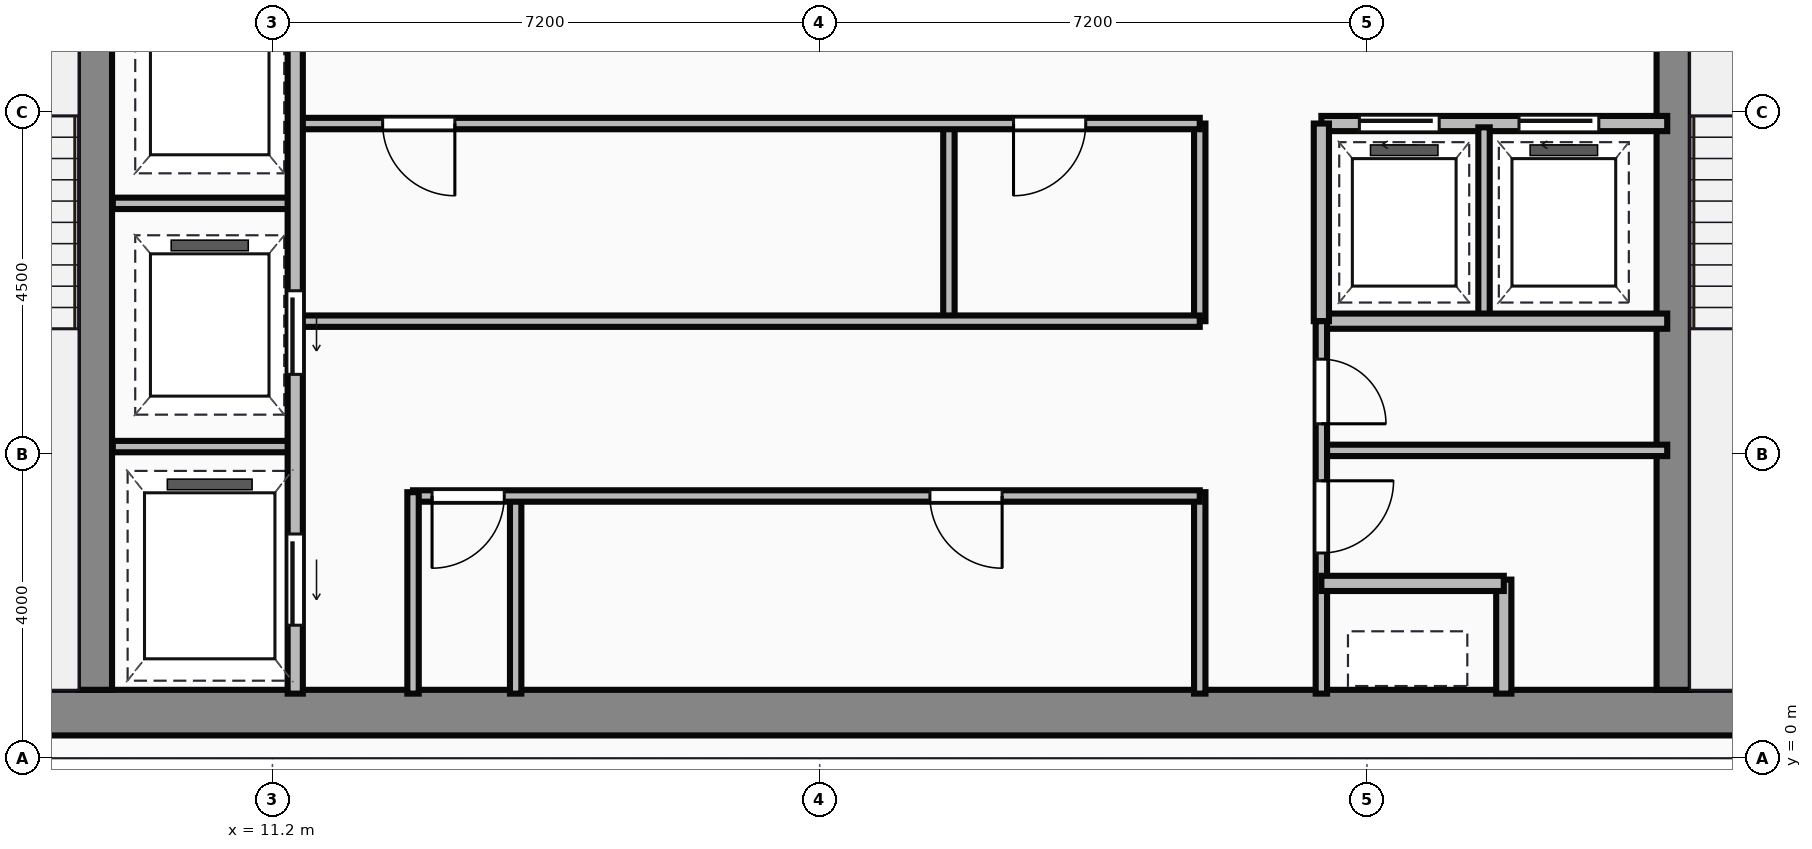
"""IFC4 building model, lengths in metres.
Left out: names, types, materials, properties, quantities, classifications, styles, units other than length and angle.
Written with IfcOpenShell. Run it as: python <this file> out.ifc"""

import sys

from ifc_helpers import new_model, si_unit, direction, frame, frame_2d, origin, place, context, subcontext, project, spatial, rectangle, extrude, source, transform, mapped, element, fill, save


model = new_model("IFC4")
c1 = context("Model", 3, precision=1e-05, world=origin(), true_north=direction((0.0, 1.0)))
c2 = subcontext(c1, "Body", "Model", "MODEL_VIEW")
j1 = project(units=[si_unit("LENGTHUNIT", "METRE"), si_unit("PLANEANGLEUNIT", "RADIAN")], contexts=[c1])
p1 = place(None, origin())
s1 = spatial("IfcSite", under=j1, at=p1, CompositionType="ELEMENT")
p2 = place(p1, origin())
s2 = spatial("IfcBuilding", under=s1, at=p2, CompositionType="ELEMENT")
p3 = place(p2, frame((0.0, 0.0, 210.5)))
s3 = spatial("IfcBuildingStorey", under=s2, at=p3, CompositionType="ELEMENT", Elevation=210.5)
m1 = source(origin(), c2, "Body", "SweptSolid", [
    extrude(rectangle(XDim=29.5, YDim=0.6, at=frame_2d((14.75, 0.0))), origin(), (0.0, 0.0, 1.0), 3.65),
])
p4 = place(p3, frame((4.5, 0.6, 0.0), z_axis=(0.0, 0.0, 1.0), x_axis=(1.0, 0.0, 0.0)))
e1 = element("IfcWall", 1, at=p4, inside=s3, PredefinedType="SHEAR", context=c2, shape_type="MappedRepresentation", body=[
    mapped(m1, transform((0.0, 0.0, 0.0))),
])
m2 = source(origin(), c2, "Body", "SweptSolid", [
    extrude(rectangle(XDim=12.5, YDim=0.45, at=frame_2d((6.25, 0.0))), origin(), (0.0, 0.0, 1.0), 3.65),
])
for number, where, z_axis, x_axis in (
    (2, (8.865, 0.9, 0.0), (0.0, 0.0, 1.0), (0.0, 1.0, 0.0)),
    (3, (29.635, 0.9, 0.0), (0.0, 0.0, 1.0), (0.0, 1.0, 0.0)),
):
    element("IfcWall", number, at=place(p3, frame(where, z_axis=z_axis, x_axis=x_axis)), inside=s3, PredefinedType="SHEAR", context=c2, shape_type="MappedRepresentation", body=[
        mapped(m2, transform((0.0, 0.0, 0.0))),
    ])
m3 = source(origin(), c2, "Body", "SweptSolid", [
    extrude(rectangle(XDim=9.6, YDim=0.2, at=frame_2d((4.8, 0.0))), origin(), (0.0, 0.0, 1.0), 3.4),
])
p5 = place(p3, frame((11.5, 0.85, 0.0), z_axis=(0.0, 0.0, 1.0), x_axis=(0.0, 1.0, 0.0)))
e4 = element("IfcWall", 4, at=p5, inside=s3, PredefinedType="PARTITIONING", context=c2, shape_type="MappedRepresentation", body=[
    mapped(m3, transform((0.0, 0.0, 0.0))),
])
p6 = place(p5, frame((4.2, 0.0, 0.0)))
e5 = element("IfcOpeningElement", 5, at=p6, cuts=e4, PredefinedType="OPENING", context=c2, shape_type="SweptSolid", body=[
    extrude(rectangle(XDim=1.1, YDim=2.15, at=frame_2d((0.55, 1.075))), frame((0.0, 0.11, 0.0), z_axis=(0.0, -1.0, 0.0), x_axis=(1.0, 0.0, 0.0)), (0.0, 0.0, 1.0), 0.22),
])
p7 = place(p5, frame((0.9, 0.0, 0.0)))
e6 = element("IfcOpeningElement", 6, at=p7, cuts=e4, PredefinedType="OPENING", context=c2, shape_type="SweptSolid", body=[
    extrude(rectangle(XDim=1.2, YDim=2.15, at=frame_2d((0.6, 1.075))), frame((0.0, 0.11, 0.0), z_axis=(0.0, -1.0, 0.0), x_axis=(1.0, 0.0, 0.0)), (0.0, 0.0, 1.0), 0.22),
])
m4 = source(origin(), c2, "Body", "SweptSolid", [
    extrude(rectangle(XDim=2.4, YDim=0.15, at=frame_2d((1.2, 0.0))), origin(), (0.0, 0.0, 1.0), 3.4),
])
for number, where, z_axis, x_axis in (
    (7, (9.1, 4.1, 0.0), (0.0, 0.0, 1.0), (1.0, 0.0, 0.0)),
    (8, (9.1, 7.3, 0.0), (0.0, 0.0, 1.0), (1.0, 0.0, 0.0)),
):
    element("IfcWall", number, at=place(p3, frame(where, z_axis=z_axis, x_axis=x_axis)), inside=s3, PredefinedType="PARTITIONING", context=c2, shape_type="MappedRepresentation", body=[
        mapped(m4, transform((0.0, 0.0, 0.0))),
    ])
m5 = source(origin(), c2, "Body", "SweptSolid", [
    extrude(rectangle(XDim=2.65, YDim=0.15, at=frame_2d((1.325, 0.0))), origin(), (0.0, 0.0, 1.0), 3.4),
])
p8 = place(p3, frame((13.05, 0.85, 0.0), z_axis=(0.0, 0.0, 1.0), x_axis=(0.0, 1.0, 0.0)))
e9 = element("IfcWall", 9, at=p8, inside=s3, PredefinedType="PARTITIONING", context=c2, shape_type="MappedRepresentation", body=[
    mapped(m5, transform((0.0, 0.0, 0.0))),
])
m6 = source(origin(), c2, "Body", "SweptSolid", [
    extrude(rectangle(XDim=10.35, YDim=0.15, at=frame_2d((5.175, 0.0))), origin(), (0.0, 0.0, 1.0), 3.4),
])
p9 = place(p3, frame((13.05, 3.45, 0.0), z_axis=(0.0, 0.0, 1.0), x_axis=(1.0, 0.0, 0.0)))
e10 = element("IfcWall", 10, at=p9, inside=s3, PredefinedType="PARTITIONING", context=c2, shape_type="MappedRepresentation", body=[
    mapped(m6, transform((0.0, 0.0, 0.0))),
])
p10 = place(p9, frame((0.25, 0.0, 0.0)))
e11 = element("IfcOpeningElement", 11, at=p10, cuts=e10, PredefinedType="OPENING", context=c2, shape_type="SweptSolid", body=[
    extrude(rectangle(XDim=0.95, YDim=2.15, at=frame_2d((0.475, 1.075))), frame((0.0, 0.085, 0.0), z_axis=(0.0, -1.0, 0.0), x_axis=(1.0, 0.0, 0.0)), (0.0, 0.0, 1.0), 0.17),
])
p11 = place(p9, frame((6.8, 0.0, 0.0)))
e12 = element("IfcOpeningElement", 12, at=p11, cuts=e10, PredefinedType="OPENING", context=c2, shape_type="SweptSolid", body=[
    extrude(rectangle(XDim=0.95, YDim=2.15, at=frame_2d((0.475, 1.075))), frame((0.0, 0.085, 0.0), z_axis=(0.0, -1.0, 0.0), x_axis=(1.0, 0.0, 0.0)), (0.0, 0.0, 1.0), 0.17),
])
p12 = place(p3, frame((23.4, 0.85, 0.0), z_axis=(0.0, 0.0, 1.0), x_axis=(0.0, 1.0, 0.0)))
e13 = element("IfcWall", 13, at=p12, inside=s3, PredefinedType="PARTITIONING", context=c2, shape_type="MappedRepresentation", body=[
    mapped(m5, transform((0.0, 0.0, 0.0))),
])
m7 = source(origin(), c2, "Body", "SweptSolid", [
    extrude(rectangle(XDim=2.6, YDim=0.15, at=frame_2d((1.3, 0.0))), origin(), (0.0, 0.0, 1.0), 3.4),
])
p13 = place(p3, frame((14.4, 0.85, 0.0), z_axis=(0.0, 0.0, 1.0), x_axis=(0.0, 1.0, 0.0)))
e14 = element("IfcWall", 14, at=p13, inside=s3, PredefinedType="PARTITIONING", context=c2, shape_type="MappedRepresentation", body=[
    mapped(m7, transform((0.0, 0.0, 0.0))),
])
m8 = source(origin(), c2, "Body", "SweptSolid", [
    extrude(rectangle(XDim=11.85, YDim=0.15, at=frame_2d((5.925, 0.0))), origin(), (0.0, 0.0, 1.0), 3.4),
])
p14 = place(p3, frame((11.55, 5.75, 0.0), z_axis=(0.0, 0.0, 1.0), x_axis=(1.0, 0.0, 0.0)))
e15 = element("IfcWall", 15, at=p14, inside=s3, PredefinedType="PARTITIONING", context=c2, shape_type="MappedRepresentation", body=[
    mapped(m8, transform((0.0, 0.0, 0.0))),
])
p15 = place(p3, frame((11.55, 8.35, 0.0), z_axis=(0.0, 0.0, 1.0), x_axis=(1.0, 0.0, 0.0)))
e16 = element("IfcWall", 16, at=p15, inside=s3, PredefinedType="PARTITIONING", context=c2, shape_type="MappedRepresentation", body=[
    mapped(m8, transform((0.0, 0.0, 0.0))),
])
p16 = place(p15, frame((1.1, 0.0, 0.0)))
e17 = element("IfcOpeningElement", 17, at=p16, cuts=e16, PredefinedType="OPENING", context=c2, shape_type="SweptSolid", body=[
    extrude(rectangle(XDim=0.95, YDim=2.15, at=frame_2d((0.475, 1.075))), frame((0.0, 0.085, 0.0), z_axis=(0.0, -1.0, 0.0), x_axis=(1.0, 0.0, 0.0)), (0.0, 0.0, 1.0), 0.17),
])
p17 = place(p15, frame((9.4, 0.0, 0.0)))
e18 = element("IfcOpeningElement", 18, at=p17, cuts=e16, PredefinedType="OPENING", context=c2, shape_type="SweptSolid", body=[
    extrude(rectangle(XDim=0.95, YDim=2.15, at=frame_2d((0.475, 1.075))), frame((0.0, 0.085, 0.0), z_axis=(0.0, -1.0, 0.0), x_axis=(1.0, 0.0, 0.0)), (0.0, 0.0, 1.0), 0.17),
])
m9 = source(origin(), c2, "Body", "SweptSolid", [
    extrude(rectangle(XDim=2.6, YDim=0.15, at=frame_2d((1.3, 0.0))), origin(), (0.0, 0.0, 1.0), 3.4),
])
p18 = place(p3, frame((23.4, 5.75, 0.0), z_axis=(0.0, 0.0, 1.0), x_axis=(0.0, 1.0, 0.0)))
e19 = element("IfcWall", 19, at=p18, inside=s3, PredefinedType="PARTITIONING", context=c2, shape_type="MappedRepresentation", body=[
    mapped(m9, transform((0.0, 0.0, 0.0))),
])
m10 = source(origin(), c2, "Body", "SweptSolid", [
    extrude(rectangle(XDim=2.5, YDim=0.15, at=frame_2d((1.25, 0.0))), origin(), (0.0, 0.0, 1.0), 3.4),
])
p19 = place(p3, frame((20.1, 5.8, 0.0), z_axis=(0.0, 0.0, 1.0), x_axis=(0.0, 1.0, 0.0)))
e20 = element("IfcWall", 20, at=p19, inside=s3, PredefinedType="PARTITIONING", context=c2, shape_type="MappedRepresentation", body=[
    mapped(m10, transform((0.0, 0.0, 0.0))),
])
m11 = source(origin(), c2, "Body", "SweptSolid", [
    extrude(rectangle(XDim=4.55, YDim=0.2, at=frame_2d((2.275, 0.0))), origin(), (0.0, 0.0, 1.0), 3.4),
])
p20 = place(p3, frame((25.0, 8.35, 0.0), z_axis=(0.0, 0.0, 1.0), x_axis=(1.0, 0.0, 0.0)))
e21 = element("IfcWall", 21, at=p20, inside=s3, PredefinedType="PARTITIONING", context=c2, shape_type="MappedRepresentation", body=[
    mapped(m11, transform((0.0, 0.0, 0.0))),
])
p21 = place(p20, frame((0.5, 0.0, 0.0)))
e22 = element("IfcOpeningElement", 22, at=p21, cuts=e21, PredefinedType="OPENING", context=c2, shape_type="SweptSolid", body=[
    extrude(rectangle(XDim=1.05, YDim=2.15, at=frame_2d((0.525, 1.075))), frame((0.0, 0.11, 0.0), z_axis=(0.0, -1.0, 0.0), x_axis=(1.0, 0.0, 0.0)), (0.0, 0.0, 1.0), 0.22),
])
p22 = place(p20, frame((2.6, 0.0, 0.0)))
e23 = element("IfcOpeningElement", 23, at=p22, cuts=e21, PredefinedType="OPENING", context=c2, shape_type="SweptSolid", body=[
    extrude(rectangle(XDim=1.05, YDim=2.15, at=frame_2d((0.525, 1.075))), frame((0.0, 0.11, 0.0), z_axis=(0.0, -1.0, 0.0), x_axis=(1.0, 0.0, 0.0)), (0.0, 0.0, 1.0), 0.22),
])
p23 = place(p3, frame((25.0, 5.75, 0.0), z_axis=(0.0, 0.0, 1.0), x_axis=(1.0, 0.0, 0.0)))
e24 = element("IfcWall", 24, at=p23, inside=s3, PredefinedType="PARTITIONING", context=c2, shape_type="MappedRepresentation", body=[
    mapped(m11, transform((0.0, 0.0, 0.0))),
])
m12 = source(origin(), c2, "Body", "SweptSolid", [
    extrude(rectangle(XDim=2.6, YDim=0.2, at=frame_2d((1.3, 0.0))), origin(), (0.0, 0.0, 1.0), 3.4),
])
p24 = place(p3, frame((25.0, 5.75, 0.0), z_axis=(0.0, 0.0, 1.0), x_axis=(0.0, 1.0, 0.0)))
e25 = element("IfcWall", 25, at=p24, inside=s3, PredefinedType="PARTITIONING", context=c2, shape_type="MappedRepresentation", body=[
    mapped(m12, transform((0.0, 0.0, 0.0))),
])
p25 = place(p3, frame((27.14, 5.8, 0.0), z_axis=(0.0, 0.0, 1.0), x_axis=(0.0, 1.0, 0.0)))
e26 = element("IfcWall", 26, at=p25, inside=s3, PredefinedType="PARTITIONING", context=c2, shape_type="MappedRepresentation", body=[
    mapped(m10, transform((0.0, 0.0, 0.0))),
])
m13 = source(origin(), c2, "Body", "SweptSolid", [
    extrude(rectangle(XDim=4.9, YDim=0.15, at=frame_2d((2.45, 0.0))), origin(), (0.0, 0.0, 1.0), 3.4),
])
p26 = place(p3, frame((25.0, 0.85, 0.0), z_axis=(0.0, 0.0, 1.0), x_axis=(0.0, 1.0, 0.0)))
e27 = element("IfcWall", 27, at=p26, inside=s3, PredefinedType="PARTITIONING", context=c2, shape_type="MappedRepresentation", body=[
    mapped(m13, transform((0.0, 0.0, 0.0))),
])
p27 = place(p26, frame((1.85, 0.0, 0.0)))
e28 = element("IfcOpeningElement", 28, at=p27, cuts=e27, PredefinedType="OPENING", context=c2, shape_type="SweptSolid", body=[
    extrude(rectangle(XDim=0.95, YDim=2.15, at=frame_2d((0.475, 1.075))), frame((0.0, 0.085, 0.0), z_axis=(0.0, -1.0, 0.0), x_axis=(1.0, 0.0, 0.0)), (0.0, 0.0, 1.0), 0.17),
])
p28 = place(p26, frame((3.55, 0.0, 0.0)))
e29 = element("IfcOpeningElement", 29, at=p28, cuts=e27, PredefinedType="OPENING", context=c2, shape_type="SweptSolid", body=[
    extrude(rectangle(XDim=0.85, YDim=2.15, at=frame_2d((0.425, 1.075))), frame((0.0, 0.085, 0.0), z_axis=(0.0, -1.0, 0.0), x_axis=(1.0, 0.0, 0.0)), (0.0, 0.0, 1.0), 0.17),
])
m14 = source(origin(), c2, "Body", "SweptSolid", [
    extrude(rectangle(XDim=2.4, YDim=0.2, at=frame_2d((1.2, 0.0))), origin(), (0.0, 0.0, 1.0), 3.4),
])
p29 = place(p3, frame((25.0, 2.3, 0.0), z_axis=(0.0, 0.0, 1.0), x_axis=(1.0, 0.0, 0.0)))
e30 = element("IfcWall", 30, at=p29, inside=s3, PredefinedType="PARTITIONING", context=c2, shape_type="MappedRepresentation", body=[
    mapped(m14, transform((0.0, 0.0, 0.0))),
])
m15 = source(origin(), c2, "Body", "SweptSolid", [
    extrude(rectangle(XDim=1.5, YDim=0.2, at=frame_2d((0.75, 0.0))), origin(), (0.0, 0.0, 1.0), 3.4),
])
p30 = place(p3, frame((27.4, 0.85, 0.0), z_axis=(0.0, 0.0, 1.0), x_axis=(0.0, 1.0, 0.0)))
e31 = element("IfcWall", 31, at=p30, inside=s3, PredefinedType="PARTITIONING", context=c2, shape_type="MappedRepresentation", body=[
    mapped(m15, transform((0.0, 0.0, 0.0))),
])
m16 = source(origin(), c2, "Body", "SweptSolid", [
    extrude(rectangle(XDim=4.55, YDim=0.15, at=frame_2d((2.275, 0.0))), origin(), (0.0, 0.0, 1.0), 3.4),
])
p31 = place(p3, frame((25.0, 4.05, 0.0), z_axis=(0.0, 0.0, 1.0), x_axis=(1.0, 0.0, 0.0)))
e32 = element("IfcWall", 32, at=p31, inside=s3, PredefinedType="PARTITIONING", context=c2, shape_type="MappedRepresentation", body=[
    mapped(m16, transform((0.0, 0.0, 0.0))),
])
m17 = source(origin(), c2, "Body", "SweptSolid", [
    extrude(rectangle(XDim=1.1, YDim=2.15, at=frame_2d((0.55, 1.075))), frame((0.0, 0.025, 0.0), z_axis=(0.0, -1.0, 0.0), x_axis=(1.0, 0.0, 0.0)), (0.0, 0.0, 1.0), 0.05),
])
p32 = place(p6, frame((1.1, 0.0, 0.0), z_axis=(0.0, 0.0, 1.0), x_axis=(-1.0, 0.0, 0.0)))
e33 = element("IfcDoor", 33, at=p32, inside=s3, OperationType="SLIDING_TO_LEFT", PredefinedType="DOOR", context=c2, shape_type="MappedRepresentation", body=[
    mapped(m17, transform((0.0, 0.0, 0.0))),
])
fill(e5, e33)
m18 = source(origin(), c2, "Body", "SweptSolid", [
    extrude(rectangle(XDim=1.2, YDim=2.15, at=frame_2d((0.6, 1.075))), frame((0.0, 0.025, 0.0), z_axis=(0.0, -1.0, 0.0), x_axis=(1.0, 0.0, 0.0)), (0.0, 0.0, 1.0), 0.05),
])
p33 = place(p7, frame((1.2, 0.0, 0.0), z_axis=(0.0, 0.0, 1.0), x_axis=(-1.0, 0.0, 0.0)))
e34 = element("IfcDoor", 34, at=p33, inside=s3, OperationType="SLIDING_TO_LEFT", PredefinedType="DOOR", context=c2, shape_type="MappedRepresentation", body=[
    mapped(m18, transform((0.0, 0.0, 0.0))),
])
fill(e6, e34)
m19 = source(origin(), c2, "Body", "SweptSolid", [
    extrude(rectangle(XDim=0.95, YDim=2.15, at=frame_2d((0.475, 1.075))), frame((0.0, 0.025, 0.0), z_axis=(0.0, -1.0, 0.0), x_axis=(1.0, 0.0, 0.0)), (0.0, 0.0, 1.0), 0.05),
])
p34 = place(p10, origin())
e35 = element("IfcDoor", 35, at=p34, inside=s3, OperationType="SINGLE_SWING_LEFT", PredefinedType="DOOR", context=c2, shape_type="MappedRepresentation", body=[
    mapped(m19, transform((0.0, 0.0, 0.0))),
])
fill(e11, e35)
p35 = place(p11, origin())
e36 = element("IfcDoor", 36, at=p35, inside=s3, OperationType="SINGLE_SWING_RIGHT", PredefinedType="DOOR", context=c2, shape_type="MappedRepresentation", body=[
    mapped(m19, transform((0.0, 0.0, 0.0))),
])
fill(e12, e36)
p36 = place(p16, origin())
e37 = element("IfcDoor", 37, at=p36, inside=s3, OperationType="SINGLE_SWING_RIGHT", PredefinedType="DOOR", context=c2, shape_type="MappedRepresentation", body=[
    mapped(m19, transform((0.0, 0.0, 0.0))),
])
fill(e17, e37)
p37 = place(p17, origin())
e38 = element("IfcDoor", 38, at=p37, inside=s3, OperationType="SINGLE_SWING_LEFT", PredefinedType="DOOR", context=c2, shape_type="MappedRepresentation", body=[
    mapped(m19, transform((0.0, 0.0, 0.0))),
])
fill(e18, e38)
m20 = source(origin(), c2, "Body", "SweptSolid", [
    extrude(rectangle(XDim=1.05, YDim=2.15, at=frame_2d((0.525, 1.075))), frame((0.0, 0.025, 0.0), z_axis=(0.0, -1.0, 0.0), x_axis=(1.0, 0.0, 0.0)), (0.0, 0.0, 1.0), 0.05),
])
p38 = place(p21, origin())
e39 = element("IfcDoor", 39, at=p38, inside=s3, OperationType="SLIDING_TO_LEFT", PredefinedType="DOOR", context=c2, shape_type="MappedRepresentation", body=[
    mapped(m20, transform((0.0, 0.0, 0.0))),
])
fill(e22, e39)
p39 = place(p22, origin())
e40 = element("IfcDoor", 40, at=p39, inside=s3, OperationType="SLIDING_TO_LEFT", PredefinedType="DOOR", context=c2, shape_type="MappedRepresentation", body=[
    mapped(m20, transform((0.0, 0.0, 0.0))),
])
fill(e23, e40)
p40 = place(p27, origin())
e41 = element("IfcDoor", 41, at=p40, inside=s3, OperationType="SINGLE_SWING_RIGHT", PredefinedType="DOOR", context=c2, shape_type="MappedRepresentation", body=[
    mapped(m19, transform((0.0, 0.0, 0.0))),
])
fill(e28, e41)
m21 = source(origin(), c2, "Body", "SweptSolid", [
    extrude(rectangle(XDim=0.85, YDim=2.15, at=frame_2d((0.425, 1.075))), frame((0.0, 0.025, 0.0), z_axis=(0.0, -1.0, 0.0), x_axis=(1.0, 0.0, 0.0)), (0.0, 0.0, 1.0), 0.05),
])
p41 = place(p28, origin())
e42 = element("IfcDoor", 42, at=p41, inside=s3, OperationType="SINGLE_SWING_LEFT", PredefinedType="DOOR", context=c2, shape_type="MappedRepresentation", body=[
    mapped(m21, transform((0.0, 0.0, 0.0))),
])
fill(e29, e42)
save(model, sys.argv[1])
